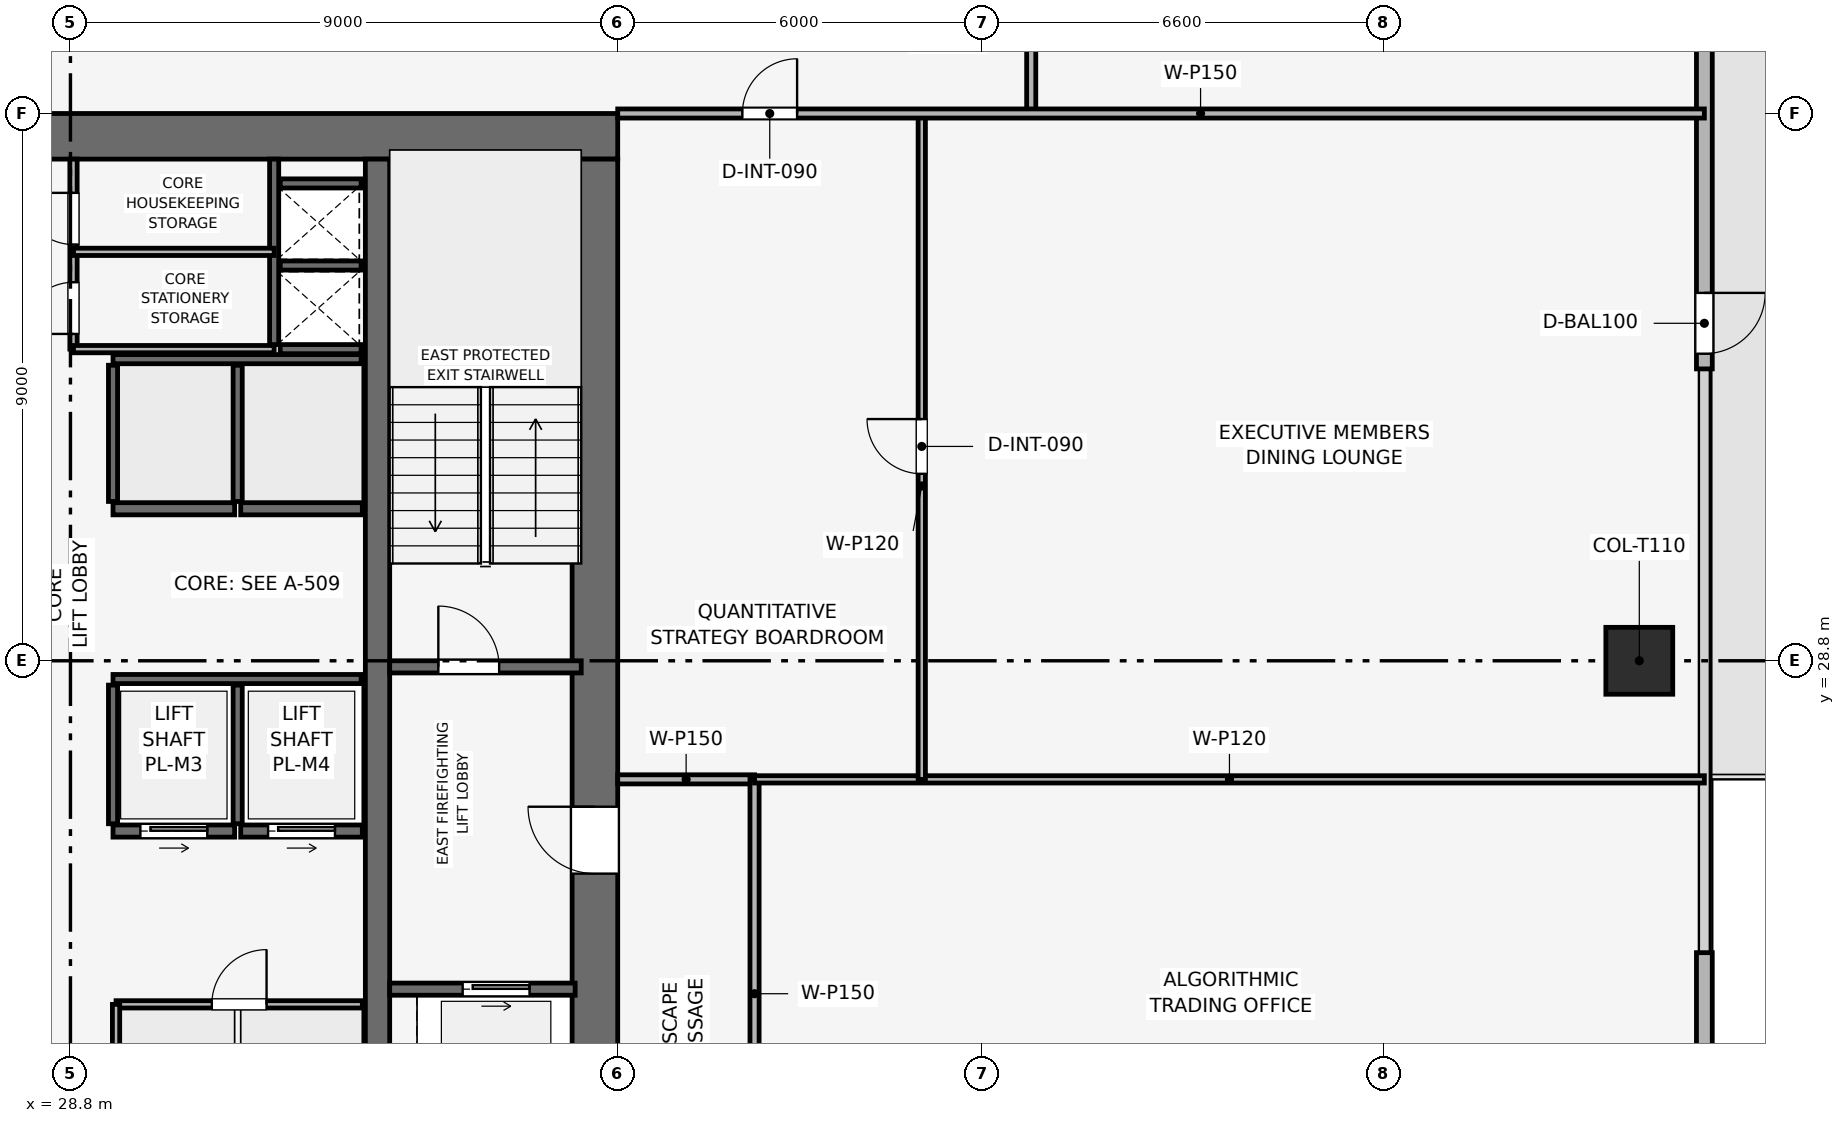
"""IFC4 building model, lengths in metres.
Left out: names, types, materials, properties, quantities, classifications, styles, units other than length and angle.
Written with IfcOpenShell. Run it as: python <this file> out.ifc"""

import sys

from ifc_helpers import new_model, si_unit, direction, frame, frame_2d, origin, origin_2d, place, context, subcontext, project, spatial, rectangle, extrude, element, fill, save


model = new_model("IFC4")
c1 = context("Model", 3, precision=1e-05, world=origin(), true_north=direction((0.0, 1.0)))
c2 = subcontext(c1, "Body", "Model", "MODEL_VIEW")
j1 = project(units=[si_unit("LENGTHUNIT", "METRE"), si_unit("PLANEANGLEUNIT", "RADIAN")], contexts=[c1])
p1 = place(None, origin())
s1 = spatial("IfcSite", under=j1, at=p1, CompositionType="ELEMENT")
p2 = place(p1, origin())
s2 = spatial("IfcBuilding", under=s1, at=p2, CompositionType="ELEMENT")
p3 = place(p2, frame((0.0, 0.0, 211.2)))
s3 = spatial("IfcBuildingStorey", under=s2, at=p3, CompositionType="ELEMENT", Elevation=211.2)
p4 = place(p3, frame((19.8, 37.425, 0.0), z_axis=(0.0, 0.0, 1.0), x_axis=(1.0, 0.0, 0.0)))
e1 = element("IfcWall", 1, at=p4, inside=s3, PredefinedType="SHEAR", context=c2, shape_type="SweptSolid", body=[
    extrude(rectangle(XDim=18.0, YDim=0.75, at=frame_2d((9.0, 0.0))), origin(), (0.0, 0.0, 1.0), 3.75),
])
p5 = place(p4, frame((7.05, 0.0, 0.0)))
e2 = element("IfcOpeningElement", 2, at=p5, cuts=e1, PredefinedType="OPENING", context=c2, shape_type="SweptSolid", body=[
    extrude(rectangle(XDim=1.1, YDim=2.15, at=frame_2d((0.55, 1.075))), frame((0.0, 0.385, 0.0), z_axis=(0.0, -1.0, 0.0), x_axis=(1.0, 0.0, 0.0)), (0.0, 0.0, 1.0), 0.77),
])
p6 = place(p3, frame((37.425, 20.55, 0.0), z_axis=(0.0, 0.0, 1.0), x_axis=(0.0, 1.0, 0.0)))
e3 = element("IfcWall", 3, at=p6, inside=s3, PredefinedType="SHEAR", context=c2, shape_type="SweptSolid", body=[
    extrude(rectangle(XDim=16.5, YDim=0.75, at=frame_2d((8.25, 0.0))), origin(), (0.0, 0.0, 1.0), 3.75),
])
p7 = place(p6, frame((4.75, 0.0, 0.0)))
e4 = element("IfcOpeningElement", 4, at=p7, cuts=e3, PredefinedType="OPENING", context=c2, shape_type="SweptSolid", body=[
    extrude(rectangle(XDim=1.1, YDim=2.15, at=frame_2d((0.55, 1.075))), frame((0.0, 0.385, 0.0), z_axis=(0.0, -1.0, 0.0), x_axis=(1.0, 0.0, 0.0)), (0.0, 0.0, 1.0), 0.77),
])
p8 = place(p3, frame((33.85, 20.55, 0.0), z_axis=(0.0, 0.0, 1.0), x_axis=(0.0, 1.0, 0.0)))
e5 = element("IfcWall", 5, at=p8, inside=s3, PredefinedType="SHEAR", context=c2, shape_type="SweptSolid", body=[
    extrude(rectangle(XDim=16.5, YDim=0.4, at=frame_2d((8.25, 0.0))), origin(), (0.0, 0.0, 1.0), 3.75),
])
p9 = place(p3, frame((54.6, 28.8, 0.003), z_axis=(0.0, 0.0, 1.0), x_axis=(1.0, 0.0, 0.0)))
e6 = element("IfcColumn", 6, at=p9, inside=s3, PredefinedType="COLUMN", context=c2, shape_type="SweptSolid", body=[
    extrude(rectangle(XDim=1.1, YDim=1.1, at=origin_2d()), origin(), (0.0, 0.0, 1.0), 3.494),
])
p10 = place(p3, frame((55.67, 48.3, 0.0), z_axis=(0.0, 0.0, 1.0), x_axis=(0.0, -1.0, 0.0)))
e7 = element("IfcWall", 7, at=p10, inside=s3, PredefinedType="SOLIDWALL", context=c2, shape_type="SweptSolid", body=[
    extrude(rectangle(XDim=14.7, YDim=0.26, at=frame_2d((7.35, 0.0))), origin(), (0.0, 0.0, 1.0), 3.5),
])
p11 = place(p10, frame((13.45, 0.0, 0.0)))
e8 = element("IfcOpeningElement", 8, at=p11, cuts=e7, PredefinedType="OPENING", context=c2, shape_type="SweptSolid", body=[
    extrude(rectangle(XDim=1.0, YDim=2.2, at=frame_2d((0.5, 1.1))), frame((0.0, 0.14, 0.0), z_axis=(0.0, -1.0, 0.0), x_axis=(1.0, 0.0, 0.0)), (0.0, 0.0, 1.0), 0.28),
])
p12 = place(p3, frame((55.67, 24.0, 0.0), z_axis=(0.0, 0.0, 1.0), x_axis=(0.0, -1.0, 0.0)))
e9 = element("IfcWall", 9, at=p12, inside=s3, PredefinedType="SOLIDWALL", context=c2, shape_type="SweptSolid", body=[
    extrude(rectangle(XDim=14.7, YDim=0.26, at=frame_2d((7.35, 0.0))), origin(), (0.0, 0.0, 1.0), 3.5),
])
p13 = place(p12, frame((10.65, 0.0, 0.9)))
e10 = element("IfcOpeningElement", 10, at=p13, cuts=e9, PredefinedType="OPENING", context=c2, shape_type="SweptSolid", body=[
    extrude(rectangle(XDim=3.8, YDim=1.9, at=frame_2d((1.9, 0.95))), frame((0.0, 0.14, 0.0), z_axis=(0.0, -1.0, 0.0), x_axis=(1.0, 0.0, 0.0)), (0.0, 0.0, 1.0), 0.28),
])
p14 = place(p3, frame((34.05, 28.7, 0.0), z_axis=(0.0, 0.0, 1.0), x_axis=(1.0, 0.0, 0.0)))
e11 = element("IfcWall", 11, at=p14, inside=s3, PredefinedType="SHEAR", context=c2, shape_type="SweptSolid", body=[
    extrude(rectangle(XDim=3.15, YDim=0.2, at=frame_2d((1.575, 0.0))), origin(), (0.0, 0.0, 1.0), 3.5),
])
p15 = place(p14, frame((0.8, 0.0, 0.0)))
e12 = element("IfcOpeningElement", 12, at=p15, cuts=e11, PredefinedType="OPENING", context=c2, shape_type="SweptSolid", body=[
    extrude(rectangle(XDim=1.0, YDim=2.1, at=frame_2d((0.5, 1.05))), frame((0.0, 0.11, 0.0), z_axis=(0.0, -1.0, 0.0), x_axis=(1.0, 0.0, 0.0)), (0.0, 0.0, 1.0), 0.22),
])
p16 = place(p3, frame((32.15, 34.0, 0.0), z_axis=(0.0, 0.0, 1.0), x_axis=(0.0, 1.0, 0.0)))
e13 = element("IfcWall", 13, at=p16, inside=s3, PredefinedType="SHEAR", context=c2, shape_type="SweptSolid", body=[
    extrude(rectangle(XDim=3.05, YDim=0.15, at=frame_2d((1.525, 0.0))), origin(), (0.0, 0.0, 1.0), 3.5),
])
for number, where, z_axis, x_axis in (
    (14, (32.25, 33.925, 0.0), (0.0, 0.0, 1.0), (1.0, 0.0, 0.0)),
    (15, (32.25, 35.3, 0.0), (0.0, 0.0, 1.0), (1.0, 0.0, 0.0)),
):
    element("IfcWall", number, at=place(p3, frame(where, z_axis=z_axis, x_axis=x_axis)), inside=s3, PredefinedType="SHEAR", context=c2, shape_type="SweptSolid", body=[
        extrude(rectangle(XDim=1.33, YDim=0.15, at=frame_2d((0.665, 0.0))), origin(), (0.0, 0.0, 1.0), 3.5),
    ])
p17 = place(p3, frame((34.05, 23.4, 0.0), z_axis=(0.0, 0.0, 1.0), x_axis=(1.0, 0.0, 0.0)))
e16 = element("IfcWall", 16, at=p17, inside=s3, PredefinedType="SHEAR", context=c2, shape_type="SweptSolid", body=[
    extrude(rectangle(XDim=3.05, YDim=0.2, at=frame_2d((1.525, 0.0))), origin(), (0.0, 0.0, 1.0), 3.5),
])
p18 = place(p17, frame((1.2, 0.0, 0.0)))
e17 = element("IfcOpeningElement", 17, at=p18, cuts=e16, PredefinedType="OPENING", context=c2, shape_type="SweptSolid", body=[
    extrude(rectangle(XDim=1.1, YDim=2.15, at=frame_2d((0.55, 1.075))), frame((0.0, 0.11, 0.0), z_axis=(0.0, -1.0, 0.0), x_axis=(1.0, 0.0, 0.0)), (0.0, 0.0, 1.0), 0.22),
])
p19 = place(p3, frame((29.5, 26.0, 0.0), z_axis=(0.0, 0.0, 1.0), x_axis=(1.0, 0.0, 0.0)))
e18 = element("IfcWall", 18, at=p19, inside=s3, PredefinedType="SHEAR", context=c2, shape_type="SweptSolid", body=[
    extrude(rectangle(XDim=2.0, YDim=0.2, at=frame_2d((1.0, 0.0))), origin(), (0.0, 0.0, 1.0), 3.5),
])
p20 = place(p19, frame((0.45, 0.0, 0.0)))
e19 = element("IfcOpeningElement", 19, at=p20, cuts=e18, PredefinedType="OPENING", context=c2, shape_type="SweptSolid", body=[
    extrude(rectangle(XDim=1.1, YDim=2.15, at=frame_2d((0.55, 1.075))), frame((0.0, 0.11, 0.0), z_axis=(0.0, -1.0, 0.0), x_axis=(1.0, 0.0, 0.0)), (0.0, 0.0, 1.0), 0.22),
])
p21 = place(p3, frame((31.6, 26.0, 0.0), z_axis=(0.0, 0.0, 1.0), x_axis=(1.0, 0.0, 0.0)))
e20 = element("IfcWall", 20, at=p21, inside=s3, PredefinedType="SHEAR", context=c2, shape_type="SweptSolid", body=[
    extrude(rectangle(XDim=2.0, YDim=0.2, at=frame_2d((1.0, 0.0))), origin(), (0.0, 0.0, 1.0), 3.5),
])
p22 = place(p21, frame((0.45, 0.0, 0.0)))
e21 = element("IfcOpeningElement", 21, at=p22, cuts=e20, PredefinedType="OPENING", context=c2, shape_type="SweptSolid", body=[
    extrude(rectangle(XDim=1.1, YDim=2.15, at=frame_2d((0.55, 1.075))), frame((0.0, 0.11, 0.0), z_axis=(0.0, -1.0, 0.0), x_axis=(1.0, 0.0, 0.0)), (0.0, 0.0, 1.0), 0.22),
])
for number, where, z_axis, x_axis in (
    (22, (29.5, 31.3, 0.0), (0.0, 0.0, 1.0), (1.0, 0.0, 0.0)),
    (23, (31.6, 31.3, 0.0), (0.0, 0.0, 1.0), (1.0, 0.0, 0.0)),
):
    element("IfcWall", number, at=place(p3, frame(where, z_axis=z_axis, x_axis=x_axis)), inside=s3, PredefinedType="SHEAR", context=c2, shape_type="SweptSolid", body=[
        extrude(rectangle(XDim=2.0, YDim=0.2, at=frame_2d((1.0, 0.0))), origin(), (0.0, 0.0, 1.0), 3.5),
    ])
p23 = place(p3, frame((32.25, 36.65, 0.0), z_axis=(0.0, 0.0, 1.0), x_axis=(1.0, 0.0, 0.0)))
e24 = element("IfcWall", 24, at=p23, inside=s3, PredefinedType="SHEAR", context=c2, shape_type="SweptSolid", body=[
    extrude(rectangle(XDim=1.33, YDim=0.15, at=frame_2d((0.665, 0.0))), origin(), (0.0, 0.0, 1.0), 3.5),
])
p24 = place(p3, frame((29.5, 28.5, 0.0), z_axis=(0.0, 0.0, 1.0), x_axis=(1.0, 0.0, 0.0)))
e25 = element("IfcWall", 25, at=p24, inside=s3, PredefinedType="SHEAR", context=c2, shape_type="SweptSolid", body=[
    extrude(rectangle(XDim=4.08, YDim=0.15, at=frame_2d((2.04, 0.0))), origin(), (0.0, 0.0, 1.0), 3.5),
])
for number, where, z_axis, x_axis in (
    (26, (29.5, 26.12, 0.0), (0.0, 0.0, 1.0), (0.0, 1.0, 0.0)),
    (27, (31.55, 26.12, 0.0), (0.0, 0.0, 1.0), (0.0, 1.0, 0.0)),
):
    element("IfcWall", number, at=place(p3, frame(where, z_axis=z_axis, x_axis=x_axis)), inside=s3, PredefinedType="SHEAR", context=c2, shape_type="SweptSolid", body=[
        extrude(rectangle(XDim=2.28, YDim=0.15, at=frame_2d((1.14, 0.0))), origin(), (0.0, 0.0, 1.0), 3.5),
    ])
p25 = place(p3, frame((29.5, 33.76, 0.0), z_axis=(0.0, 0.0, 1.0), x_axis=(1.0, 0.0, 0.0)))
e28 = element("IfcWall", 28, at=p25, inside=s3, PredefinedType="SHEAR", context=c2, shape_type="SweptSolid", body=[
    extrude(rectangle(XDim=4.08, YDim=0.15, at=frame_2d((2.04, 0.0))), origin(), (0.0, 0.0, 1.0), 3.5),
])
for number, where, z_axis, x_axis in (
    (29, (29.5, 31.42, 0.0), (0.0, 0.0, 1.0), (0.0, 1.0, 0.0)),
    (30, (31.55, 31.42, 0.0), (0.0, 0.0, 1.0), (0.0, 1.0, 0.0)),
):
    element("IfcWall", number, at=place(p3, frame(where, z_axis=z_axis, x_axis=x_axis)), inside=s3, PredefinedType="SHEAR", context=c2, shape_type="SweptSolid", body=[
        extrude(rectangle(XDim=2.24, YDim=0.15, at=frame_2d((1.12, 0.0))), origin(), (0.0, 0.0, 1.0), 3.5),
    ])
p26 = place(p3, frame((28.85, 33.925, 0.0), z_axis=(0.0, 0.0, 1.0), x_axis=(0.0, 1.0, 0.0)))
e31 = element("IfcWall", 31, at=p26, inside=s3, PredefinedType="PARTITIONING", context=c2, shape_type="SweptSolid", body=[
    extrude(rectangle(XDim=3.125, YDim=0.12, at=frame_2d((1.562, 0.0))), origin(), (0.0, 0.0, 1.0), 3.5),
])
p27 = place(p26, frame((0.25, 0.0, 0.0)))
e32 = element("IfcOpeningElement", 32, at=p27, cuts=e31, PredefinedType="OPENING", context=c2, shape_type="SweptSolid", body=[
    extrude(rectangle(XDim=0.85, YDim=2.1, at=frame_2d((0.425, 1.05))), frame((0.0, 0.07, 0.0), z_axis=(0.0, -1.0, 0.0), x_axis=(1.0, 0.0, 0.0)), (0.0, 0.0, 1.0), 0.14),
])
p28 = place(p26, frame((1.72, 0.0, 0.0)))
e33 = element("IfcOpeningElement", 33, at=p28, cuts=e31, PredefinedType="OPENING", context=c2, shape_type="SweptSolid", body=[
    extrude(rectangle(XDim=0.85, YDim=2.1, at=frame_2d((0.425, 1.05))), frame((0.0, 0.07, 0.0), z_axis=(0.0, -1.0, 0.0), x_axis=(1.0, 0.0, 0.0)), (0.0, 0.0, 1.0), 0.14),
])
for number, where, z_axis, x_axis in (
    (34, (28.85, 35.525, 0.0), (0.0, 0.0, 1.0), (1.0, 0.0, 0.0)),
    (35, (28.85, 33.925, 0.0), (0.0, 0.0, 1.0), (1.0, 0.0, 0.0)),
):
    element("IfcWall", number, at=place(p3, frame(where, z_axis=z_axis, x_axis=x_axis)), inside=s3, PredefinedType="PARTITIONING", context=c2, shape_type="SweptSolid", body=[
        extrude(rectangle(XDim=3.3, YDim=0.12, at=frame_2d((1.65, 0.0))), origin(), (0.0, 0.0, 1.0), 3.5),
    ])
p29 = place(p3, frame((29.55, 23.15, 0.0), z_axis=(0.0, 0.0, 1.0), x_axis=(1.0, 0.0, 0.0)))
e36 = element("IfcWall", 36, at=p29, inside=s3, PredefinedType="PARTITIONING", context=c2, shape_type="SweptSolid", body=[
    extrude(rectangle(XDim=4.05, YDim=0.12, at=frame_2d((2.025, 0.0))), origin(), (0.0, 0.0, 1.0), 3.5),
])
p30 = place(p29, frame((1.575, 0.0, 0.0)))
e37 = element("IfcOpeningElement", 37, at=p30, cuts=e36, PredefinedType="OPENING", context=c2, shape_type="SweptSolid", body=[
    extrude(rectangle(XDim=0.9, YDim=2.1, at=frame_2d((0.45, 1.05))), frame((0.0, 0.07, 0.0), z_axis=(0.0, -1.0, 0.0), x_axis=(1.0, 0.0, 0.0)), (0.0, 0.0, 1.0), 0.14),
])
p31 = place(p3, frame((29.55, 20.4, 0.0), z_axis=(0.0, 0.0, 1.0), x_axis=(0.0, 1.0, 0.0)))
e38 = element("IfcWall", 38, at=p31, inside=s3, PredefinedType="PARTITIONING", context=c2, shape_type="SweptSolid", body=[
    extrude(rectangle(XDim=2.75, YDim=0.12, at=frame_2d((1.375, 0.0))), origin(), (0.0, 0.0, 1.0), 3.5),
])
p32 = place(p3, frame((37.8, 26.85, 0.0), z_axis=(0.0, 0.0, 1.0), x_axis=(1.0, 0.0, 0.0)))
e39 = element("IfcWall", 39, at=p32, inside=s3, PredefinedType="PARTITIONING", context=c2, shape_type="SweptSolid", body=[
    extrude(rectangle(XDim=2.25, YDim=0.15, at=frame_2d((1.125, 0.0))), origin(), (0.0, 0.0, 1.0), 3.5),
])
p33 = place(p3, frame((40.05, 19.8, 0.0), z_axis=(0.0, 0.0, 1.0), x_axis=(0.0, 1.0, 0.0)))
e40 = element("IfcWall", 40, at=p33, inside=s3, PredefinedType="PARTITIONING", context=c2, shape_type="SweptSolid", body=[
    extrude(rectangle(XDim=7.05, YDim=0.15, at=frame_2d((3.525, 0.0))), origin(), (0.0, 0.0, 1.0), 3.035),
])
p34 = place(p3, frame((40.05, 26.85, 0.0), z_axis=(0.0, 0.0, 1.0), x_axis=(1.0, 0.0, 0.0)))
e41 = element("IfcWall", 41, at=p34, inside=s3, PredefinedType="PARTITIONING", context=c2, shape_type="SweptSolid", body=[
    extrude(rectangle(XDim=15.62, YDim=0.12, at=frame_2d((7.81, 0.0))), origin(), (0.0, 0.0, 1.0), 2.885),
])
p35 = place(p3, frame((42.8, 26.85, 0.0), z_axis=(0.0, 0.0, 1.0), x_axis=(0.0, 1.0, 0.0)))
e42 = element("IfcWall", 42, at=p35, inside=s3, PredefinedType="PARTITIONING", context=c2, shape_type="SweptSolid", body=[
    extrude(rectangle(XDim=10.95, YDim=0.12, at=frame_2d((5.475, 0.0))), origin(), (0.0, 0.0, 1.0), 3.035),
])
p36 = place(p35, frame((5.025, 0.0, 0.0)))
e43 = element("IfcOpeningElement", 43, at=p36, cuts=e42, PredefinedType="OPENING", context=c2, shape_type="SweptSolid", body=[
    extrude(rectangle(XDim=0.9, YDim=2.1, at=frame_2d((0.45, 1.05))), frame((0.0, 0.07, 0.0), z_axis=(0.0, -1.0, 0.0), x_axis=(1.0, 0.0, 0.0)), (0.0, 0.0, 1.0), 0.14),
])
p37 = place(p3, frame((44.6, 37.8, 0.0), z_axis=(0.0, 0.0, 1.0), x_axis=(0.0, 1.0, 0.0)))
e44 = element("IfcWall", 44, at=p37, inside=s3, PredefinedType="PARTITIONING", context=c2, shape_type="SweptSolid", body=[
    extrude(rectangle(XDim=2.4, YDim=0.15, at=frame_2d((1.2, 0.0))), origin(), (0.0, 0.0, 1.0), 3.5),
])
p38 = place(p3, frame((37.8, 37.8, 0.0), z_axis=(0.0, 0.0, 1.0), x_axis=(1.0, 0.0, 0.0)))
e45 = element("IfcWall", 45, at=p38, inside=s3, PredefinedType="PARTITIONING", context=c2, shape_type="SweptSolid", body=[
    extrude(rectangle(XDim=17.87, YDim=0.15, at=frame_2d((8.935, 0.0))), origin(), (0.0, 0.0, 1.0), 2.885),
])
p39 = place(p38, frame((2.05, 0.0, 0.0)))
e46 = element("IfcOpeningElement", 46, at=p39, cuts=e45, PredefinedType="OPENING", context=c2, shape_type="SweptSolid", body=[
    extrude(rectangle(XDim=0.9, YDim=2.1, at=frame_2d((0.45, 1.05))), frame((0.0, 0.085, 0.0), z_axis=(0.0, -1.0, 0.0), x_axis=(1.0, 0.0, 0.0)), (0.0, 0.0, 1.0), 0.17),
])
p40 = place(p11, origin())
e47 = element("IfcDoor", 47, at=p40, inside=s3, OperationType="SINGLE_SWING_LEFT", PredefinedType="DOOR", context=c2, shape_type="SweptSolid", body=[
    extrude(rectangle(XDim=1.0, YDim=2.2, at=frame_2d((0.5, 1.1))), frame((0.0, 0.025, 0.0), z_axis=(0.0, -1.0, 0.0), x_axis=(1.0, 0.0, 0.0)), (0.0, 0.0, 1.0), 0.05),
])
fill(e8, e47)
p41 = place(p15, origin())
e48 = element("IfcDoor", 48, at=p41, inside=s3, OperationType="SINGLE_SWING_LEFT", PredefinedType="DOOR", context=c2, shape_type="SweptSolid", body=[
    extrude(rectangle(XDim=1.0, YDim=2.1, at=frame_2d((0.5, 1.05))), frame((0.0, 0.025, 0.0), z_axis=(0.0, -1.0, 0.0), x_axis=(1.0, 0.0, 0.0)), (0.0, 0.0, 1.0), 0.05),
])
fill(e12, e48)
p42 = place(p18, origin())
e49 = element("IfcDoor", 49, at=p42, inside=s3, OperationType="SLIDING_TO_RIGHT", PredefinedType="DOOR", context=c2, shape_type="SweptSolid", body=[
    extrude(rectangle(XDim=1.1, YDim=2.15, at=frame_2d((0.55, 1.075))), frame((0.0, 0.025, 0.0), z_axis=(0.0, -1.0, 0.0), x_axis=(1.0, 0.0, 0.0)), (0.0, 0.0, 1.0), 0.05),
])
fill(e17, e49)
p43 = place(p20, origin())
e50 = element("IfcDoor", 50, at=p43, inside=s3, OperationType="SLIDING_TO_RIGHT", PredefinedType="DOOR", context=c2, shape_type="SweptSolid", body=[
    extrude(rectangle(XDim=1.1, YDim=2.15, at=frame_2d((0.55, 1.075))), frame((0.0, 0.025, 0.0), z_axis=(0.0, -1.0, 0.0), x_axis=(1.0, 0.0, 0.0)), (0.0, 0.0, 1.0), 0.05),
])
fill(e19, e50)
p44 = place(p22, origin())
e51 = element("IfcDoor", 51, at=p44, inside=s3, OperationType="SLIDING_TO_RIGHT", PredefinedType="DOOR", context=c2, shape_type="SweptSolid", body=[
    extrude(rectangle(XDim=1.1, YDim=2.15, at=frame_2d((0.55, 1.075))), frame((0.0, 0.025, 0.0), z_axis=(0.0, -1.0, 0.0), x_axis=(1.0, 0.0, 0.0)), (0.0, 0.0, 1.0), 0.05),
])
fill(e21, e51)
p45 = place(p27, origin())
e52 = element("IfcDoor", 52, at=p45, inside=s3, OperationType="SINGLE_SWING_LEFT", PredefinedType="DOOR", context=c2, shape_type="SweptSolid", body=[
    extrude(rectangle(XDim=0.85, YDim=2.1, at=frame_2d((0.425, 1.05))), frame((0.0, 0.025, 0.0), z_axis=(0.0, -1.0, 0.0), x_axis=(1.0, 0.0, 0.0)), (0.0, 0.0, 1.0), 0.05),
])
fill(e32, e52)
p46 = place(p28, origin())
e53 = element("IfcDoor", 53, at=p46, inside=s3, OperationType="SINGLE_SWING_RIGHT", PredefinedType="DOOR", context=c2, shape_type="SweptSolid", body=[
    extrude(rectangle(XDim=0.85, YDim=2.1, at=frame_2d((0.425, 1.05))), frame((0.0, 0.025, 0.0), z_axis=(0.0, -1.0, 0.0), x_axis=(1.0, 0.0, 0.0)), (0.0, 0.0, 1.0), 0.05),
])
fill(e33, e53)
p47 = place(p30, origin())
e54 = element("IfcDoor", 54, at=p47, inside=s3, OperationType="SINGLE_SWING_RIGHT", PredefinedType="DOOR", context=c2, shape_type="SweptSolid", body=[
    extrude(rectangle(XDim=0.9, YDim=2.1, at=frame_2d((0.45, 1.05))), frame((0.0, 0.025, 0.0), z_axis=(0.0, -1.0, 0.0), x_axis=(1.0, 0.0, 0.0)), (0.0, 0.0, 1.0), 0.05),
])
fill(e37, e54)
p48 = place(p36, origin())
e55 = element("IfcDoor", 55, at=p48, inside=s3, OperationType="SINGLE_SWING_RIGHT", PredefinedType="DOOR", context=c2, shape_type="SweptSolid", body=[
    extrude(rectangle(XDim=0.9, YDim=2.1, at=frame_2d((0.45, 1.05))), frame((0.0, 0.025, 0.0), z_axis=(0.0, -1.0, 0.0), x_axis=(1.0, 0.0, 0.0)), (0.0, 0.0, 1.0), 0.05),
])
fill(e43, e55)
p49 = place(p39, origin())
e56 = element("IfcDoor", 56, at=p49, inside=s3, OperationType="SINGLE_SWING_RIGHT", PredefinedType="DOOR", context=c2, shape_type="SweptSolid", body=[
    extrude(rectangle(XDim=0.9, YDim=2.1, at=frame_2d((0.45, 1.05))), frame((0.0, 0.025, 0.0), z_axis=(0.0, -1.0, 0.0), x_axis=(1.0, 0.0, 0.0)), (0.0, 0.0, 1.0), 0.05),
])
fill(e46, e56)
p50 = place(p7, origin())
e57 = element("IfcDoor", 57, at=p50, inside=s3, OperationType="SINGLE_SWING_RIGHT", PredefinedType="DOOR", context=c2, shape_type="SweptSolid", body=[
    extrude(rectangle(XDim=1.1, YDim=2.15, at=frame_2d((0.55, 1.075))), frame((0.0, 0.025, 0.0), z_axis=(0.0, -1.0, 0.0), x_axis=(1.0, 0.0, 0.0)), (0.0, 0.0, 1.0), 0.05),
])
fill(e4, e57)
save(model, sys.argv[1])
